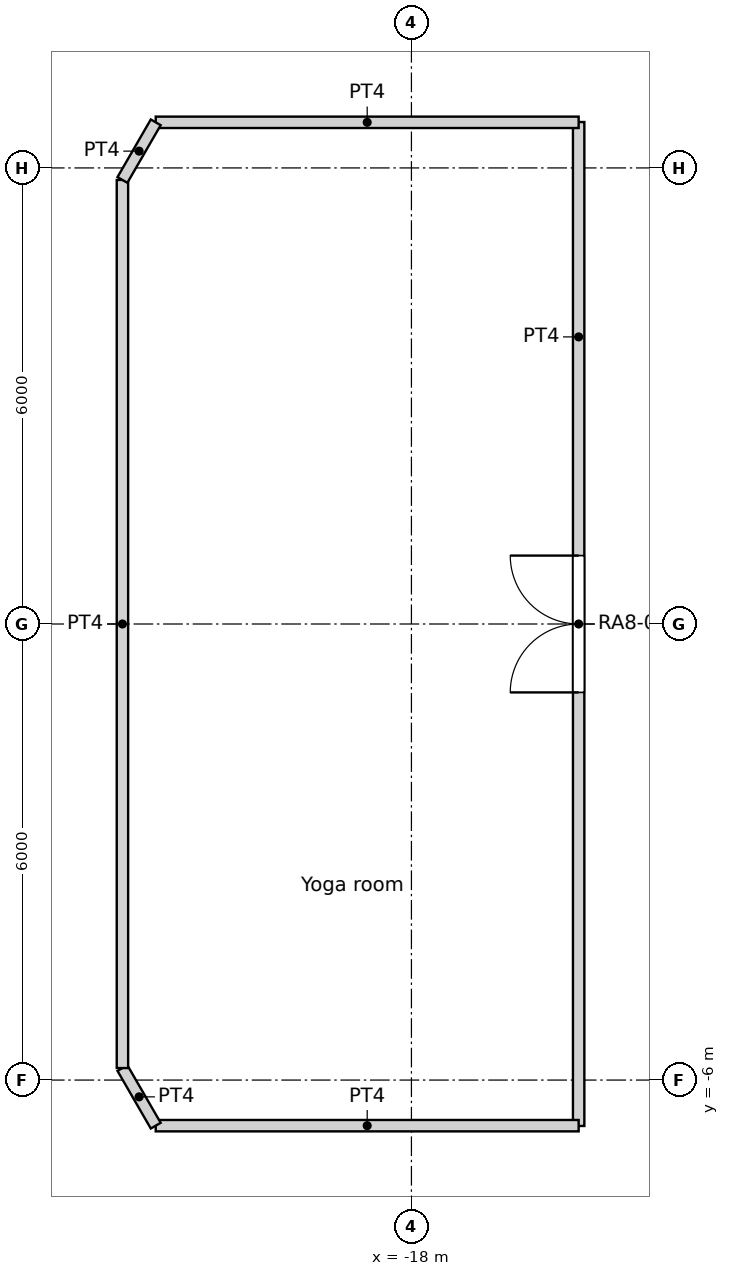
"""IFC4 building model, lengths in metres.
Left out: names, types, materials, properties, quantities, classifications, styles, units other than length and angle.
Written with IfcOpenShell. Run it as: python <this file> out.ifc"""

import sys

from ifc_helpers import new_model, si_unit, direction, frame, frame_2d, origin, origin_2d, place, context, subcontext, project, spatial, rectangle, circle, extrude, element, fill, save


model = new_model("IFC4")
c1 = context("Model", 3, precision=1e-05, world=origin(), true_north=direction((0.0, 1.0)))
c2 = subcontext(c1, "Body", "Model", "MODEL_VIEW")
j1 = project(units=[si_unit("LENGTHUNIT", "METRE"), si_unit("PLANEANGLEUNIT", "RADIAN")], contexts=[c1])
p1 = place(None, origin())
s1 = spatial("IfcSite", under=j1, at=p1, CompositionType="ELEMENT")
p2 = place(p1, origin())
s2 = spatial("IfcBuilding", under=s1, at=p2, CompositionType="ELEMENT")
p3 = place(p2, frame((0.0, 0.0, 103.8)))
s3 = spatial("IfcBuildingStorey", under=s2, at=p3, CompositionType="ELEMENT", Elevation=103.8)
for number, where, z_axis, x_axis in (
    (1, (-16.958, 8.167, 0.0), (0.0, 0.0, 1.0), (1.0, 0.0, 0.0)),
    (2, (-18.612, 2.805, 0.0), (0.0, 0.0, 1.0), (1.0, 0.0, 0.0)),
    (3, (-18.612, -2.805, 0.0), (0.0, 0.0, 1.0), (1.0, 0.0, 0.0)),
    (4, (-16.958, -8.167, 0.0), (0.0, 0.0, 1.0), (1.0, 0.0, 0.0)),
):
    element("IfcColumn", number, at=place(p3, frame(where, z_axis=z_axis, x_axis=x_axis)), inside=s3, PredefinedType="COLUMN", context=c2, shape_type="SweptSolid", body=[
        extrude(circle(Radius=0.7, at=origin_2d()), origin(), (0.0, 0.0, 1.0), 3.6),
    ])
p4 = place(p3, frame((-15.8, -6.604, 0.0), z_axis=(0.0, 0.0, 1.0), x_axis=(0.0, 1.0, 0.0)))
e5 = element("IfcWall", 5, at=p4, inside=s3, PredefinedType="PARTITIONING", context=c2, shape_type="SweptSolid", body=[
    extrude(rectangle(XDim=13.208, YDim=0.15, at=frame_2d((6.604, 0.0))), origin(), (0.0, 0.0, 1.0), 3.15),
])
p5 = place(p4, frame((5.704, 0.0, 0.0)))
e6 = element("IfcOpeningElement", 6, at=p5, cuts=e5, PredefinedType="OPENING", context=c2, shape_type="SweptSolid", body=[
    extrude(rectangle(XDim=1.8, YDim=2.1, at=frame_2d((0.9, 1.05))), frame((0.0, 0.075, 0.0), z_axis=(0.0, -1.0, 0.0), x_axis=(1.0, 0.0, 0.0)), (0.0, 0.0, 1.0), 0.15),
])
p6 = place(p3, frame((-25.255, 7.416, 0.0), z_axis=(0.0, 0.0, 1.0), x_axis=(0.540805851332, 0.841147449123, 0.0)))
e7 = element("IfcWall", 7, at=p6, inside=s3, PredefinedType="PARTITIONING", context=c2, shape_type="SweptSolid", body=[
    extrude(rectangle(XDim=14.829, YDim=0.15, at=frame_2d((7.415, 0.0))), origin(), (0.0, 0.0, 1.0), 3.15),
])
p7 = place(p6, frame((8.754, 0.0, 0.0)))
e8 = element("IfcOpeningElement", 8, at=p7, cuts=e7, PredefinedType="OPENING", context=c2, shape_type="SweptSolid", body=[
    extrude(rectangle(XDim=1.0, YDim=2.04, at=frame_2d((0.5, 1.02))), frame((0.0, 0.075, 0.0), z_axis=(0.0, -1.0, 0.0), x_axis=(1.0, 0.0, 0.0)), (0.0, 0.0, 1.0), 0.15),
])
p8 = place(p6, frame((0.316, 0.0, 0.0)))
e9 = element("IfcOpeningElement", 9, at=p8, cuts=e7, PredefinedType="OPENING", context=c2, shape_type="SweptSolid", body=[
    extrude(rectangle(XDim=1.0, YDim=2.1, at=frame_2d((0.5, 1.05))), frame((0.0, 0.075, 0.0), z_axis=(0.0, -1.0, 0.0), x_axis=(1.0, 0.0, 0.0)), (0.0, 0.0, 1.0), 0.15),
])
p9 = place(p3, frame((-21.364, 6.6, 0.0), z_axis=(0.0, 0.0, 1.0), x_axis=(1.0, 0.0, 0.0)))
e10 = element("IfcWall", 10, at=p9, inside=s3, PredefinedType="PARTITIONING", context=c2, shape_type="SweptSolid", body=[
    extrude(rectangle(XDim=5.564, YDim=0.15, at=frame_2d((2.782, 0.0))), origin(), (0.0, 0.0, 1.0), 3.15),
])
p10 = place(p3, frame((-21.802, 5.842, 0.0), z_axis=(0.0, 0.0, 1.0), x_axis=(0.500277597875, 0.865865073245, 0.0)))
e11 = element("IfcWall", 11, at=p10, inside=s3, PredefinedType="PARTITIONING", context=c2, shape_type="SweptSolid", body=[
    extrude(rectangle(XDim=0.875, YDim=0.15, at=frame_2d((0.438, 0.0))), origin(), (0.0, 0.0, 1.0), 3.15),
])
p11 = place(p3, frame((-21.802, -5.842, 0.0), z_axis=(0.0, 0.0, 1.0), x_axis=(0.0, 1.0, 0.0)))
e12 = element("IfcWall", 12, at=p11, inside=s3, PredefinedType="PARTITIONING", context=c2, shape_type="SweptSolid", body=[
    extrude(rectangle(XDim=11.684, YDim=0.15, at=frame_2d((5.842, 0.0))), origin(), (0.0, 0.0, 1.0), 3.15),
])
p12 = place(p3, frame((-21.802, -5.842, 0.0), z_axis=(0.0, 0.0, 1.0), x_axis=(0.500277597875, -0.865865073245, 0.0)))
e13 = element("IfcWall", 13, at=p12, inside=s3, PredefinedType="PARTITIONING", context=c2, shape_type="SweptSolid", body=[
    extrude(rectangle(XDim=0.875, YDim=0.15, at=frame_2d((0.438, 0.0))), origin(), (0.0, 0.0, 1.0), 3.15),
])
p13 = place(p3, frame((-21.364, -6.6, 0.0), z_axis=(0.0, 0.0, 1.0), x_axis=(1.0, 0.0, 0.0)))
e14 = element("IfcWall", 14, at=p13, inside=s3, PredefinedType="PARTITIONING", context=c2, shape_type="SweptSolid", body=[
    extrude(rectangle(XDim=5.564, YDim=0.15, at=frame_2d((2.782, 0.0))), origin(), (0.0, 0.0, 1.0), 3.15),
])
p14 = place(p3, frame((-25.253, -7.415, 0.0), z_axis=(0.0, 0.0, 1.0), x_axis=(0.541385585623, -0.840774433293, 0.0)))
e15 = element("IfcWall", 15, at=p14, inside=s3, PredefinedType="PARTITIONING", context=c2, shape_type="SweptSolid", body=[
    extrude(rectangle(XDim=5.5, YDim=0.15, at=frame_2d((2.75, 0.0))), origin(), (0.0, 0.0, 1.0), 3.15),
])
p15 = place(p14, frame((3.522, 0.0, 0.0)))
e16 = element("IfcOpeningElement", 16, at=p15, cuts=e15, PredefinedType="OPENING", context=c2, shape_type="SweptSolid", body=[
    extrude(rectangle(XDim=1.0, YDim=2.1, at=frame_2d((0.5, 1.05))), frame((0.0, 0.075, 0.0), z_axis=(0.0, -1.0, 0.0), x_axis=(1.0, 0.0, 0.0)), (0.0, 0.0, 1.0), 0.15),
])
p16 = place(p5, origin())
e17 = element("IfcDoor", 17, at=p16, inside=s3, OperationType="DOUBLE_DOOR_SINGLE_SWING", PredefinedType="DOOR", context=c2, shape_type="SweptSolid", body=[
    extrude(rectangle(XDim=1.8, YDim=2.1, at=frame_2d((0.9, 1.05))), frame((0.0, 0.025, 0.0), z_axis=(0.0, -1.0, 0.0), x_axis=(1.0, 0.0, 0.0)), (0.0, 0.0, 1.0), 0.05),
])
fill(e6, e17)
save(model, sys.argv[1])
